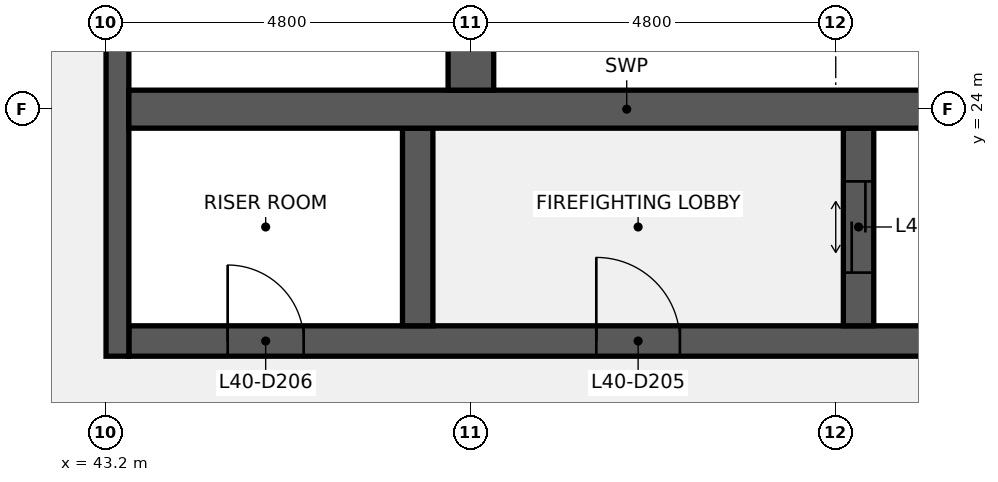
"""IFC4 building model, lengths in metres.
Left out: names, types, materials, properties, quantities, classifications, styles, units other than length and angle.
Written with IfcOpenShell. Run it as: python <this file> out.ifc"""

import sys

from ifc_helpers import new_model, si_unit, direction, frame, frame_2d, origin, place, context, subcontext, project, spatial, rectangle, extrude, element, fill, save


model = new_model("IFC4")
c1 = context("Model", 3, precision=1e-05, world=origin(), true_north=direction((0.0, 1.0)))
c2 = subcontext(c1, "Body", "Model", "MODEL_VIEW")
j1 = project(units=[si_unit("LENGTHUNIT", "METRE"), si_unit("PLANEANGLEUNIT", "RADIAN")], contexts=[c1])
p1 = place(None, origin())
s1 = spatial("IfcSite", under=j1, at=p1, CompositionType="ELEMENT")
p2 = place(p1, origin())
s2 = spatial("IfcBuilding", under=s1, at=p2, CompositionType="ELEMENT")
p3 = place(p2, frame((0.0, 0.0, 180.6)))
s3 = spatial("IfcBuildingStorey", under=s2, at=p3, CompositionType="ELEMENT", Elevation=180.6)
p4 = place(p3, frame((43.5, 20.95, 0.0), z_axis=(0.0, 0.0, 1.0), x_axis=(1.0, 0.0, 0.0)))
e1 = element("IfcWall", 1, at=p4, inside=s3, PredefinedType="SHEAR", context=c2, shape_type="SweptSolid", body=[
    extrude(rectangle(XDim=13.1, YDim=0.4, at=frame_2d((6.55, 0.0))), origin(), (0.0, 0.0, 1.0), 12.3),
])
p5 = place(p4, frame((6.15, 0.0, 0.0)))
e2 = element("IfcOpeningElement", 2, at=p5, cuts=e1, PredefinedType="OPENING", context=c2, shape_type="SweptSolid", body=[
    extrude(rectangle(XDim=1.1, YDim=2.1, at=frame_2d((0.55, 1.05))), frame((0.0, 0.21, 0.0), z_axis=(0.0, -1.0, 0.0), x_axis=(1.0, 0.0, 0.0)), (0.0, 0.0, 1.0), 0.42),
])
p6 = place(p4, frame((1.3, 0.0, 0.0)))
e3 = element("IfcOpeningElement", 3, at=p6, cuts=e1, PredefinedType="OPENING", context=c2, shape_type="SweptSolid", body=[
    extrude(rectangle(XDim=1.0, YDim=2.1, at=frame_2d((0.5, 1.05))), frame((0.0, 0.21, 0.0), z_axis=(0.0, -1.0, 0.0), x_axis=(1.0, 0.0, 0.0)), (0.0, 0.0, 1.0), 0.42),
])
p7 = place(p3, frame((43.35, 20.75, 0.0), z_axis=(0.0, 0.0, 1.0), x_axis=(0.0, 1.0, 0.0)))
e4 = element("IfcWall", 4, at=p7, inside=s3, PredefinedType="SHEAR", context=c2, shape_type="SweptSolid", body=[
    extrude(rectangle(XDim=6.5, YDim=0.3, at=frame_2d((3.25, 0.0))), origin(), (0.0, 0.0, 1.0), 12.3),
])
p8 = place(p3, frame((53.1, 21.15, 0.0), z_axis=(0.0, 0.0, 1.0), x_axis=(0.0, 1.0, 0.0)))
e5 = element("IfcWall", 5, at=p8, inside=s3, PredefinedType="SHEAR", context=c2, shape_type="SweptSolid", body=[
    extrude(rectangle(XDim=2.6, YDim=0.4, at=frame_2d((1.3, 0.0))), origin(), (0.0, 0.0, 1.0), 12.3),
])
p9 = place(p8, frame((0.7, 0.0, 0.0)))
e6 = element("IfcOpeningElement", 6, at=p9, cuts=e5, PredefinedType="OPENING", context=c2, shape_type="SweptSolid", body=[
    extrude(rectangle(XDim=1.2, YDim=2.1, at=frame_2d((0.6, 1.05))), frame((0.0, 0.21, 0.0), z_axis=(0.0, -1.0, 0.0), x_axis=(1.0, 0.0, 0.0)), (0.0, 0.0, 1.0), 0.42),
])
p10 = place(p3, frame((47.3, 21.15, 0.0), z_axis=(0.0, 0.0, 1.0), x_axis=(0.0, 1.0, 0.0)))
e7 = element("IfcWall", 7, at=p10, inside=s3, PredefinedType="SHEAR", context=c2, shape_type="SweptSolid", body=[
    extrude(rectangle(XDim=2.6, YDim=0.4, at=frame_2d((1.3, 0.0))), origin(), (0.0, 0.0, 1.0), 12.3),
])
p11 = place(p3, frame((43.5, 24.0, 0.0), z_axis=(0.0, 0.0, 1.0), x_axis=(1.0, 0.0, 0.0)))
e8 = element("IfcWall", 8, at=p11, inside=s3, PredefinedType="SHEAR", context=c2, shape_type="SweptSolid", body=[
    extrude(rectangle(XDim=13.1, YDim=0.5, at=frame_2d((6.55, 0.0))), origin(), (0.0, 0.0, 1.0), 12.3),
])
p12 = place(p3, frame((48.0, 24.25, 0.0), z_axis=(0.0, 0.0, 1.0), x_axis=(0.0, 1.0, 0.0)))
e9 = element("IfcWall", 9, at=p12, inside=s3, PredefinedType="SHEAR", context=c2, shape_type="SweptSolid", body=[
    extrude(rectangle(XDim=2.6, YDim=0.6, at=frame_2d((1.3, 0.0))), origin(), (0.0, 0.0, 1.0), 12.3),
])
p13 = place(p5, origin())
e10 = element("IfcDoor", 10, at=p13, inside=s3, OperationType="SINGLE_SWING_LEFT", PredefinedType="DOOR", context=c2, shape_type="SweptSolid", body=[
    extrude(rectangle(XDim=1.1, YDim=2.1, at=frame_2d((0.55, 1.05))), frame((0.0, 0.025, 0.0), z_axis=(0.0, -1.0, 0.0), x_axis=(1.0, 0.0, 0.0)), (0.0, 0.0, 1.0), 0.05),
])
fill(e2, e10)
p14 = place(p6, origin())
e11 = element("IfcDoor", 11, at=p14, inside=s3, OperationType="SINGLE_SWING_LEFT", PredefinedType="DOOR", context=c2, shape_type="SweptSolid", body=[
    extrude(rectangle(XDim=1.0, YDim=2.1, at=frame_2d((0.5, 1.05))), frame((0.0, 0.025, 0.0), z_axis=(0.0, -1.0, 0.0), x_axis=(1.0, 0.0, 0.0)), (0.0, 0.0, 1.0), 0.05),
])
fill(e3, e11)
p15 = place(p9, origin())
e12 = element("IfcDoor", 12, at=p15, inside=s3, OperationType="DOUBLE_DOOR_SLIDING", PredefinedType="DOOR", context=c2, shape_type="SweptSolid", body=[
    extrude(rectangle(XDim=1.2, YDim=2.1, at=frame_2d((0.6, 1.05))), frame((0.0, 0.025, 0.0), z_axis=(0.0, -1.0, 0.0), x_axis=(1.0, 0.0, 0.0)), (0.0, 0.0, 1.0), 0.05),
])
fill(e6, e12)
save(model, sys.argv[1])
